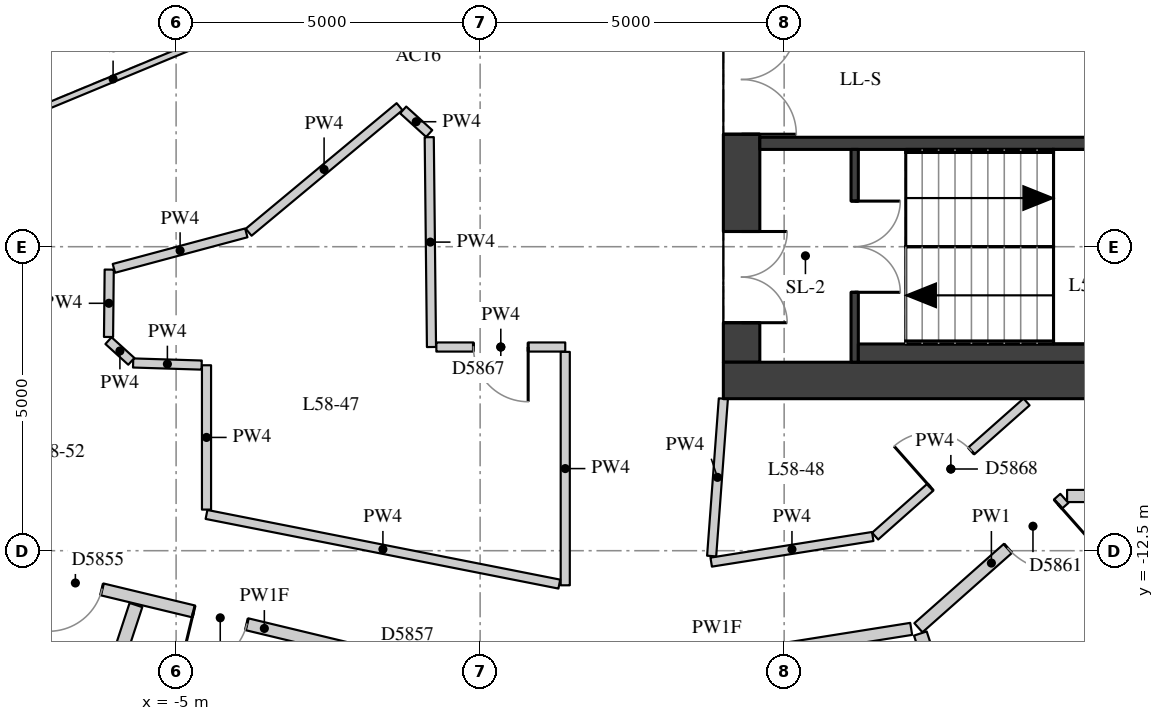
"""IFC4 building model, lengths in metres.
Left out: names, types, materials, properties, quantities, classifications, styles, units other than length and angle.
Written with IfcOpenShell. Run it as: python <this file> out.ifc"""

import sys

from ifc_helpers import new_model, si_unit, direction, frame, frame_2d, origin, place, context, subcontext, project, spatial, rectangle, extrude, element, fill, save


model = new_model("IFC4")
c1 = context("Model", 3, precision=1e-05, world=origin(), true_north=direction((0.0, 1.0)))
c2 = subcontext(c1, "Body", "Model", "MODEL_VIEW")
j1 = project(units=[si_unit("LENGTHUNIT", "METRE"), si_unit("PLANEANGLEUNIT", "RADIAN")], contexts=[c1])
p1 = place(None, origin())
s1 = spatial("IfcSite", under=j1, at=p1, CompositionType="ELEMENT")
p2 = place(p1, origin())
s2 = spatial("IfcBuilding", under=s1, at=p2, CompositionType="ELEMENT")
p3 = place(p2, frame((0.0, 0.0, 205.7)))
s3 = spatial("IfcBuildingStorey", under=s2, at=p3, CompositionType="ELEMENT", Elevation=205.7)
p4 = place(p3, frame((4.3, -9.4, 0.0), z_axis=(0.0, 0.0, 1.0), x_axis=(0.0, 1.0, 0.0)))
e1 = element("IfcWall", 1, at=p4, inside=s3, PredefinedType="SHEAR", context=c2, shape_type="SweptSolid", body=[
    extrude(rectangle(XDim=18.8, YDim=0.6, at=frame_2d((9.4, 0.0))), origin(), (0.0, 0.0, 1.0), 3.02),
])
p5 = place(p4, frame((0.65, 0.0, 0.0)))
e2 = element("IfcOpeningElement", 2, at=p5, cuts=e1, PredefinedType="OPENING", context=c2, shape_type="SweptSolid", body=[
    extrude(rectangle(XDim=1.5, YDim=2.1, at=frame_2d((0.75, 1.05))), frame((0.0, 0.31, 0.0), z_axis=(0.0, -1.0, 0.0), x_axis=(1.0, 0.0, 0.0)), (0.0, 0.0, 1.0), 0.62),
])
p6 = place(p4, frame((3.75, 0.0, 0.0)))
e3 = element("IfcOpeningElement", 3, at=p6, cuts=e1, PredefinedType="OPENING", context=c2, shape_type="SweptSolid", body=[
    extrude(rectangle(XDim=1.8, YDim=2.1, at=frame_2d((0.9, 1.05))), frame((0.0, 0.31, 0.0), z_axis=(0.0, -1.0, 0.0), x_axis=(1.0, 0.0, 0.0)), (0.0, 0.0, 1.0), 0.62),
])
p7 = place(p4, frame((6.25, 0.0, 0.0)))
e4 = element("IfcOpeningElement", 4, at=p7, cuts=e1, PredefinedType="OPENING", context=c2, shape_type="SweptSolid", body=[
    extrude(rectangle(XDim=1.1, YDim=2.1, at=frame_2d((0.55, 1.05))), frame((0.0, 0.31, 0.0), z_axis=(0.0, -1.0, 0.0), x_axis=(1.0, 0.0, 0.0)), (0.0, 0.0, 1.0), 0.62),
])
p8 = place(p4, frame((8.9, 0.0, 0.0)))
e5 = element("IfcOpeningElement", 5, at=p8, cuts=e1, PredefinedType="OPENING", context=c2, shape_type="SweptSolid", body=[
    extrude(rectangle(XDim=1.0, YDim=2.1, at=frame_2d((0.5, 1.05))), frame((0.0, 0.31, 0.0), z_axis=(0.0, -1.0, 0.0), x_axis=(1.0, 0.0, 0.0)), (0.0, 0.0, 1.0), 0.62),
])
p9 = place(p4, frame((11.45, 0.0, 0.0)))
e6 = element("IfcOpeningElement", 6, at=p9, cuts=e1, PredefinedType="OPENING", context=c2, shape_type="SweptSolid", body=[
    extrude(rectangle(XDim=1.1, YDim=2.1, at=frame_2d((0.55, 1.05))), frame((0.0, 0.31, 0.0), z_axis=(0.0, -1.0, 0.0), x_axis=(1.0, 0.0, 0.0)), (0.0, 0.0, 1.0), 0.62),
])
p10 = place(p4, frame((13.25, 0.0, 0.0)))
e7 = element("IfcOpeningElement", 7, at=p10, cuts=e1, PredefinedType="OPENING", context=c2, shape_type="SweptSolid", body=[
    extrude(rectangle(XDim=1.8, YDim=2.1, at=frame_2d((0.9, 1.05))), frame((0.0, 0.31, 0.0), z_axis=(0.0, -1.0, 0.0), x_axis=(1.0, 0.0, 0.0)), (0.0, 0.0, 1.0), 0.62),
])
p11 = place(p4, frame((16.65, 0.0, 0.0)))
e8 = element("IfcOpeningElement", 8, at=p11, cuts=e1, PredefinedType="OPENING", context=c2, shape_type="SweptSolid", body=[
    extrude(rectangle(XDim=1.5, YDim=2.1, at=frame_2d((0.75, 1.05))), frame((0.0, 0.31, 0.0), z_axis=(0.0, -1.0, 0.0), x_axis=(1.0, 0.0, 0.0)), (0.0, 0.0, 1.0), 0.62),
])
p12 = place(p3, frame((4.0, -9.7, 0.0), z_axis=(0.0, 0.0, 1.0), x_axis=(1.0, 0.0, 0.0)))
e9 = element("IfcWall", 9, at=p12, inside=s3, PredefinedType="SHEAR", context=c2, shape_type="SweptSolid", body=[
    extrude(rectangle(XDim=12.0, YDim=0.6, at=frame_2d((6.0, 0.0))), origin(), (0.0, 0.0, 1.0), 3.02),
])
p13 = place(p3, frame((4.6, -5.8, 0.0), z_axis=(0.0, 0.0, 1.0), x_axis=(1.0, 0.0, 0.0)))
e10 = element("IfcWall", 10, at=p13, inside=s3, PredefinedType="SHEAR", context=c2, shape_type="SweptSolid", body=[
    extrude(rectangle(XDim=10.8, YDim=0.2, at=frame_2d((5.4, 0.0))), origin(), (0.0, 0.0, 1.0), 3.02),
])
p14 = place(p3, frame((6.16, -9.4, 0.0), z_axis=(0.0, 0.0, 1.0), x_axis=(0.0, 1.0, 0.0)))
e11 = element("IfcWall", 11, at=p14, inside=s3, PredefinedType="SHEAR", context=c2, shape_type="SweptSolid", body=[
    extrude(rectangle(XDim=3.5, YDim=0.12, at=frame_2d((1.75, 0.0))), origin(), (0.0, 0.0, 1.0), 3.02),
])
p15 = place(p14, frame((1.15, 0.0, 0.0)))
e12 = element("IfcOpeningElement", 12, at=p15, cuts=e11, PredefinedType="OPENING", context=c2, shape_type="SweptSolid", body=[
    extrude(rectangle(XDim=1.5, YDim=2.1, at=frame_2d((0.75, 1.05))), frame((0.0, 0.07, 0.0), z_axis=(0.0, -1.0, 0.0), x_axis=(1.0, 0.0, 0.0)), (0.0, 0.0, 1.0), 0.14),
])
p16 = place(p3, frame((6.22, -9.25, 0.0), z_axis=(0.0, 0.0, 1.0), x_axis=(1.0, 0.0, 0.0)))
e13 = element("IfcWall", 13, at=p16, inside=s3, PredefinedType="PARTITIONING", context=c2, shape_type="SweptSolid", body=[
    extrude(rectangle(XDim=4.88, YDim=0.3, at=frame_2d((2.44, 0.0))), origin(), (0.0, 0.0, 1.0), 3.02),
])
p17 = place(p3, frame((17.5, -11.6, 0.0), z_axis=(0.0, 0.0, 1.0), x_axis=(-1.0, 0.0, 0.0)))
e14 = element("IfcWall", 14, at=p17, inside=s3, PredefinedType="PARTITIONING", context=c2, shape_type="SweptSolid", body=[
    extrude(rectangle(XDim=7.847, YDim=0.2, at=frame_2d((3.923, 0.0))), origin(), (0.0, 0.0, 1.0), 3.02),
])
p18 = place(p3, frame((9.608, -11.64, 0.0), z_axis=(0.0, 0.0, 1.0), x_axis=(-0.748412200225, -0.663233879227, 0.0)))
e15 = element("IfcWall", 15, at=p18, inside=s3, PredefinedType="PARTITIONING", context=c2, shape_type="SweptSolid", body=[
    extrude(rectangle(XDim=3.207, YDim=0.2, at=frame_2d((1.604, 0.0))), origin(), (0.0, 0.0, 1.0), 3.02),
])
p19 = place(p18, frame((0.14, 0.0, 0.0)))
e16 = element("IfcOpeningElement", 16, at=p19, cuts=e15, PredefinedType="OPENING", context=c2, shape_type="SweptSolid", body=[
    extrude(rectangle(XDim=1.1, YDim=2.1, at=frame_2d((0.55, 1.05))), frame((0.0, 0.11, 0.0), z_axis=(0.0, -1.0, 0.0), x_axis=(1.0, 0.0, 0.0)), (0.0, 0.0, 1.0), 0.22),
])
p20 = place(p3, frame((7.089, -13.786, 0.0), z_axis=(0.0, 0.0, 1.0), x_axis=(-0.987636270411, -0.156762869867, 0.0)))
e17 = element("IfcWall", 17, at=p20, inside=s3, PredefinedType="PARTITIONING", context=c2, shape_type="SweptSolid", body=[
    extrude(rectangle(XDim=6.469, YDim=0.2, at=frame_2d((3.235, 0.0))), origin(), (0.0, 0.0, 1.0), 2.42),
])
p21 = place(p20, frame((5.016, 0.0, 0.0)))
e18 = element("IfcOpeningElement", 18, at=p21, cuts=e17, PredefinedType="OPENING", context=c2, shape_type="SweptSolid", body=[
    extrude(rectangle(XDim=1.1, YDim=2.1, at=frame_2d((0.55, 1.05))), frame((0.0, 0.11, 0.0), z_axis=(0.0, -1.0, 0.0), x_axis=(1.0, 0.0, 0.0)), (0.0, 0.0, 1.0), 0.22),
])
p22 = place(p3, frame((0.602, -14.777, 0.0), z_axis=(0.0, 0.0, 1.0), x_axis=(-0.972266752798, 0.23387467029, 0.0)))
e19 = element("IfcWall", 19, at=p22, inside=s3, PredefinedType="PARTITIONING", context=c2, shape_type="SweptSolid", body=[
    extrude(rectangle(XDim=8.539, YDim=0.2, at=frame_2d((4.27, 0.0))), origin(), (0.0, 0.0, 1.0), 2.42),
])
p23 = place(p22, frame((7.016, 0.0, 0.0)))
e20 = element("IfcOpeningElement", 20, at=p23, cuts=e19, PredefinedType="OPENING", context=c2, shape_type="SweptSolid", body=[
    extrude(rectangle(XDim=0.9, YDim=2.1, at=frame_2d((0.45, 1.05))), frame((0.0, 0.11, 0.0), z_axis=(0.0, -1.0, 0.0), x_axis=(1.0, 0.0, 0.0)), (0.0, 0.0, 1.0), 0.22),
])
p24 = place(p22, frame((4.565, 0.0, 0.0)))
e21 = element("IfcOpeningElement", 21, at=p24, cuts=e19, PredefinedType="OPENING", context=c2, shape_type="SweptSolid", body=[
    extrude(rectangle(XDim=0.9, YDim=2.1, at=frame_2d((0.45, 1.05))), frame((0.0, 0.11, 0.0), z_axis=(0.0, -1.0, 0.0), x_axis=(1.0, 0.0, 0.0)), (0.0, 0.0, 1.0), 0.22),
])
p25 = place(p22, frame((1.78, 0.0, 0.0)))
e22 = element("IfcOpeningElement", 22, at=p25, cuts=e19, PredefinedType="OPENING", context=c2, shape_type="SweptSolid", body=[
    extrude(rectangle(XDim=0.9, YDim=2.1, at=frame_2d((0.45, 1.05))), frame((0.0, 0.11, 0.0), z_axis=(0.0, -1.0, 0.0), x_axis=(1.0, 0.0, 0.0)), (0.0, 0.0, 1.0), 0.22),
])
p26 = place(p3, frame((-3.807, -7.262, 0.0), z_axis=(0.0, 0.0, 1.0), x_axis=(0.768654933145, 0.639663656739, 0.0)))
e23 = element("IfcWall", 23, at=p26, inside=s3, PredefinedType="PARTITIONING", context=c2, shape_type="SweptSolid", body=[
    extrude(rectangle(XDim=3.229, YDim=0.15, at=frame_2d((1.615, 0.0))), origin(), (0.0, 0.0, 1.0), 3.02),
])
p27 = place(p3, frame((-1.266, -5.25, 0.0), z_axis=(0.0, 0.0, 1.0), x_axis=(0.740704364941, -0.671831112525, 0.0)))
e24 = element("IfcWall", 24, at=p27, inside=s3, PredefinedType="PARTITIONING", context=c2, shape_type="SweptSolid", body=[
    extrude(rectangle(XDim=0.578, YDim=0.15, at=frame_2d((0.289, 0.0))), origin(), (0.0, 0.0, 1.0), 3.02),
])
p28 = place(p3, frame((-0.837, -5.699, 0.0), z_axis=(0.0, 0.0, 1.0), x_axis=(0.010681337428, -0.999942952888, 0.0)))
e25 = element("IfcWall", 25, at=p28, inside=s3, PredefinedType="PARTITIONING", context=c2, shape_type="SweptSolid", body=[
    extrude(rectangle(XDim=3.451, YDim=0.15, at=frame_2d((1.726, 0.0))), origin(), (0.0, 0.0, 1.0), 3.02),
])
p29 = place(p3, frame((-0.72, -9.15, 0.0), z_axis=(0.0, 0.0, 1.0), x_axis=(1.0, 0.0, 0.0)))
e26 = element("IfcWall", 26, at=p29, inside=s3, PredefinedType="PARTITIONING", context=c2, shape_type="SweptSolid", body=[
    extrude(rectangle(XDim=2.12, YDim=0.15, at=frame_2d((1.06, 0.0))), origin(), (0.0, 0.0, 1.0), 3.02),
])
p30 = place(p29, frame((0.61, 0.0, 0.0)))
e27 = element("IfcOpeningElement", 27, at=p30, cuts=e26, PredefinedType="OPENING", context=c2, shape_type="SweptSolid", body=[
    extrude(rectangle(XDim=0.9, YDim=2.1, at=frame_2d((0.45, 1.05))), frame((0.0, 0.085, 0.0), z_axis=(0.0, -1.0, 0.0), x_axis=(1.0, 0.0, 0.0)), (0.0, 0.0, 1.0), 0.17),
])
p31 = place(p3, frame((1.4, -9.23, 0.0), z_axis=(0.0, 0.0, 1.0), x_axis=(0.0, -1.0, 0.0)))
e28 = element("IfcWall", 28, at=p31, inside=s3, PredefinedType="PARTITIONING", context=c2, shape_type="SweptSolid", body=[
    extrude(rectangle(XDim=3.839, YDim=0.15, at=frame_2d((1.919, 0.0))), origin(), (0.0, 0.0, 1.0), 3.02),
])
p32 = place(p3, frame((1.302, -13.049, 0.0), z_axis=(0.0, 0.0, 1.0), x_axis=(-0.981063502149, 0.193686356647, 0.0)))
e29 = element("IfcWall", 29, at=p32, inside=s3, PredefinedType="PARTITIONING", context=c2, shape_type="SweptSolid", body=[
    extrude(rectangle(XDim=5.914, YDim=0.15, at=frame_2d((2.957, 0.0))), origin(), (0.0, 0.0, 1.0), 3.02),
])
p33 = place(p3, frame((-4.5, -11.824, 0.0), z_axis=(0.0, 0.0, 1.0), x_axis=(0.0, 1.0, 0.0)))
e30 = element("IfcWall", 30, at=p33, inside=s3, PredefinedType="PARTITIONING", context=c2, shape_type="SweptSolid", body=[
    extrude(rectangle(XDim=2.374, YDim=0.15, at=frame_2d((1.187, 0.0))), origin(), (0.0, 0.0, 1.0), 3.02),
])
p34 = place(p3, frame((-4.58, -9.447, 0.0), z_axis=(0.0, 0.0, 1.0), x_axis=(-0.999526758156, 0.030761334993, 0.0)))
e31 = element("IfcWall", 31, at=p34, inside=s3, PredefinedType="PARTITIONING", context=c2, shape_type="SweptSolid", body=[
    extrude(rectangle(XDim=1.127, YDim=0.15, at=frame_2d((0.563, 0.0))), origin(), (0.0, 0.0, 1.0), 3.02),
])
p35 = place(p3, frame((-5.736, -9.385, 0.0), z_axis=(0.0, 0.0, 1.0), x_axis=(-0.740919573429, 0.671593765389, 0.0)))
e32 = element("IfcWall", 32, at=p35, inside=s3, PredefinedType="PARTITIONING", context=c2, shape_type="SweptSolid", body=[
    extrude(rectangle(XDim=0.507, YDim=0.15, at=frame_2d((0.253, 0.0))), origin(), (0.0, 0.0, 1.0), 3.02),
])
p36 = place(p3, frame((-6.111, -8.985, 0.0), z_axis=(0.0, 0.0, 1.0), x_axis=(0.010133870444, 0.999948651017, 0.0)))
e33 = element("IfcWall", 33, at=p36, inside=s3, PredefinedType="PARTITIONING", context=c2, shape_type="SweptSolid", body=[
    extrude(rectangle(XDim=1.108, YDim=0.15, at=frame_2d((0.554, 0.0))), origin(), (0.0, 0.0, 1.0), 3.02),
])
p37 = place(p3, frame((-6.023, -7.856, 0.0), z_axis=(0.0, 0.0, 1.0), x_axis=(0.965887119847, 0.25896345633, 0.0)))
e34 = element("IfcWall", 34, at=p37, inside=s3, PredefinedType="PARTITIONING", context=c2, shape_type="SweptSolid", body=[
    extrude(rectangle(XDim=2.254, YDim=0.15, at=frame_2d((1.127, 0.0))), origin(), (0.0, 0.0, 1.0), 3.02),
])
p38 = place(p3, frame((8.987, -10.052, 0.0), z_axis=(0.0, 0.0, 1.0), x_axis=(-0.74833949077, -0.66331591761, 0.0)))
e35 = element("IfcWall", 35, at=p38, inside=s3, PredefinedType="PARTITIONING", context=c2, shape_type="SweptSolid", body=[
    extrude(rectangle(XDim=3.328, YDim=0.15, at=frame_2d((1.664, 0.0))), origin(), (0.0, 0.0, 1.0), 3.02),
])
p39 = place(p38, frame((1.214, 0.0, 0.0)))
e36 = element("IfcOpeningElement", 36, at=p39, cuts=e35, PredefinedType="OPENING", context=c2, shape_type="SweptSolid", body=[
    extrude(rectangle(XDim=0.9, YDim=2.1, at=frame_2d((0.45, 1.05))), frame((0.0, 0.085, 0.0), z_axis=(0.0, -1.0, 0.0), x_axis=(1.0, 0.0, 0.0)), (0.0, 0.0, 1.0), 0.17),
])
p40 = place(p3, frame((6.457, -12.266, 0.0), z_axis=(0.0, 0.0, 1.0), x_axis=(-0.987639766053, -0.156740845063, 0.0)))
e37 = element("IfcWall", 37, at=p40, inside=s3, PredefinedType="PARTITIONING", context=c2, shape_type="SweptSolid", body=[
    extrude(rectangle(XDim=2.69, YDim=0.15, at=frame_2d((1.345, 0.0))), origin(), (0.0, 0.0, 1.0), 3.02),
])
p41 = place(p3, frame((3.807, -12.588, 0.0), z_axis=(0.0, 0.0, 1.0), x_axis=(0.07420077159, 0.997243323114, 0.0)))
e38 = element("IfcWall", 38, at=p41, inside=s3, PredefinedType="PARTITIONING", context=c2, shape_type="SweptSolid", body=[
    extrude(rectangle(XDim=2.596, YDim=0.15, at=frame_2d((1.298, 0.0))), origin(), (0.0, 0.0, 1.0), 3.02),
])
p42 = place(p3, frame((-7.907, -20.235, 0.0), z_axis=(0.0, 0.0, 1.0), x_axis=(0.312013837279, 0.950077557543, 0.0)))
e39 = element("IfcWall", 39, at=p42, inside=s3, PredefinedType="PARTITIONING", context=c2, shape_type="SweptSolid", body=[
    extrude(rectangle(XDim=7.201, YDim=0.22, at=frame_2d((3.601, 0.0))), origin(), (0.0, 0.0, 1.0), 3.02),
])
p43 = place(p3, frame((8.908, -18.944, 0.0), z_axis=(0.0, 0.0, 1.0), x_axis=(-0.311910788491, 0.950111393481, 0.0)))
e40 = element("IfcWall", 40, at=p43, inside=s3, PredefinedType="PARTITIONING", context=c2, shape_type="SweptSolid", body=[
    extrude(rectangle(XDim=5.348, YDim=0.22, at=frame_2d((2.674, 0.0))), origin(), (0.0, 0.0, 1.0), 3.02),
])
p44 = place(p3, frame((-4.073, -3.927, 0.0), z_axis=(0.0, 0.0, 1.0), x_axis=(-0.923860025149, -0.382730523909, 0.0)))
e41 = element("IfcWall", 41, at=p44, inside=s3, PredefinedType="PARTITIONING", context=c2, shape_type="SweptSolid", body=[
    extrude(rectangle(XDim=4.251, YDim=0.1, at=frame_2d((2.125, 0.0))), origin(), (0.0, 0.0, 1.0), 3.02),
])
p45 = place(p5, origin())
e42 = element("IfcDoor", 42, at=p45, inside=s3, OperationType="DOUBLE_DOOR_SINGLE_SWING", PredefinedType="DOOR", context=c2, shape_type="SweptSolid", body=[
    extrude(rectangle(XDim=1.5, YDim=2.1, at=frame_2d((0.75, 1.05))), frame((0.0, 0.025, 0.0), z_axis=(0.0, -1.0, 0.0), x_axis=(1.0, 0.0, 0.0)), (0.0, 0.0, 1.0), 0.05),
])
fill(e2, e42)
p46 = place(p6, origin())
e43 = element("IfcDoor", 43, at=p46, inside=s3, OperationType="DOUBLE_DOOR_SINGLE_SWING", PredefinedType="DOOR", context=c2, shape_type="SweptSolid", body=[
    extrude(rectangle(XDim=1.8, YDim=2.1, at=frame_2d((0.9, 1.05))), frame((0.0, 0.025, 0.0), z_axis=(0.0, -1.0, 0.0), x_axis=(1.0, 0.0, 0.0)), (0.0, 0.0, 1.0), 0.05),
])
fill(e3, e43)
p47 = place(p15, origin())
e44 = element("IfcDoor", 44, at=p47, inside=s3, OperationType="DOUBLE_DOOR_SINGLE_SWING", PredefinedType="DOOR", context=c2, shape_type="SweptSolid", body=[
    extrude(rectangle(XDim=1.5, YDim=2.1, at=frame_2d((0.75, 1.05))), frame((0.0, 0.025, 0.0), z_axis=(0.0, -1.0, 0.0), x_axis=(1.0, 0.0, 0.0)), (0.0, 0.0, 1.0), 0.05),
])
fill(e12, e44)
p48 = place(p23, origin())
e45 = element("IfcDoor", 45, at=p48, inside=s3, OperationType="SINGLE_SWING_RIGHT", PredefinedType="DOOR", context=c2, shape_type="SweptSolid", body=[
    extrude(rectangle(XDim=0.9, YDim=2.1, at=frame_2d((0.45, 1.05))), frame((0.0, 0.025, 0.0), z_axis=(0.0, -1.0, 0.0), x_axis=(1.0, 0.0, 0.0)), (0.0, 0.0, 1.0), 0.05),
])
fill(e20, e45)
p49 = place(p24, origin())
e46 = element("IfcDoor", 46, at=p49, inside=s3, OperationType="SINGLE_SWING_RIGHT", PredefinedType="DOOR", context=c2, shape_type="SweptSolid", body=[
    extrude(rectangle(XDim=0.9, YDim=2.1, at=frame_2d((0.45, 1.05))), frame((0.0, 0.025, 0.0), z_axis=(0.0, -1.0, 0.0), x_axis=(1.0, 0.0, 0.0)), (0.0, 0.0, 1.0), 0.05),
])
fill(e21, e46)
p50 = place(p19, origin())
e47 = element("IfcDoor", 47, at=p50, inside=s3, OperationType="SINGLE_SWING_LEFT", PredefinedType="DOOR", context=c2, shape_type="SweptSolid", body=[
    extrude(rectangle(XDim=1.1, YDim=2.1, at=frame_2d((0.55, 1.05))), frame((0.0, 0.025, 0.0), z_axis=(0.0, -1.0, 0.0), x_axis=(1.0, 0.0, 0.0)), (0.0, 0.0, 1.0), 0.05),
])
fill(e16, e47)
p51 = place(p30, origin())
e48 = element("IfcDoor", 48, at=p51, inside=s3, OperationType="SINGLE_SWING_LEFT", PredefinedType="DOOR", context=c2, shape_type="SweptSolid", body=[
    extrude(rectangle(XDim=0.9, YDim=2.1, at=frame_2d((0.45, 1.05))), frame((0.0, 0.025, 0.0), z_axis=(0.0, -1.0, 0.0), x_axis=(1.0, 0.0, 0.0)), (0.0, 0.0, 1.0), 0.05),
])
fill(e27, e48)
p52 = place(p39, origin())
e49 = element("IfcDoor", 49, at=p52, inside=s3, OperationType="SINGLE_SWING_LEFT", PredefinedType="DOOR", context=c2, shape_type="SweptSolid", body=[
    extrude(rectangle(XDim=0.9, YDim=2.1, at=frame_2d((0.45, 1.05))), frame((0.0, 0.025, 0.0), z_axis=(0.0, -1.0, 0.0), x_axis=(1.0, 0.0, 0.0)), (0.0, 0.0, 1.0), 0.05),
])
fill(e36, e49)
save(model, sys.argv[1])
